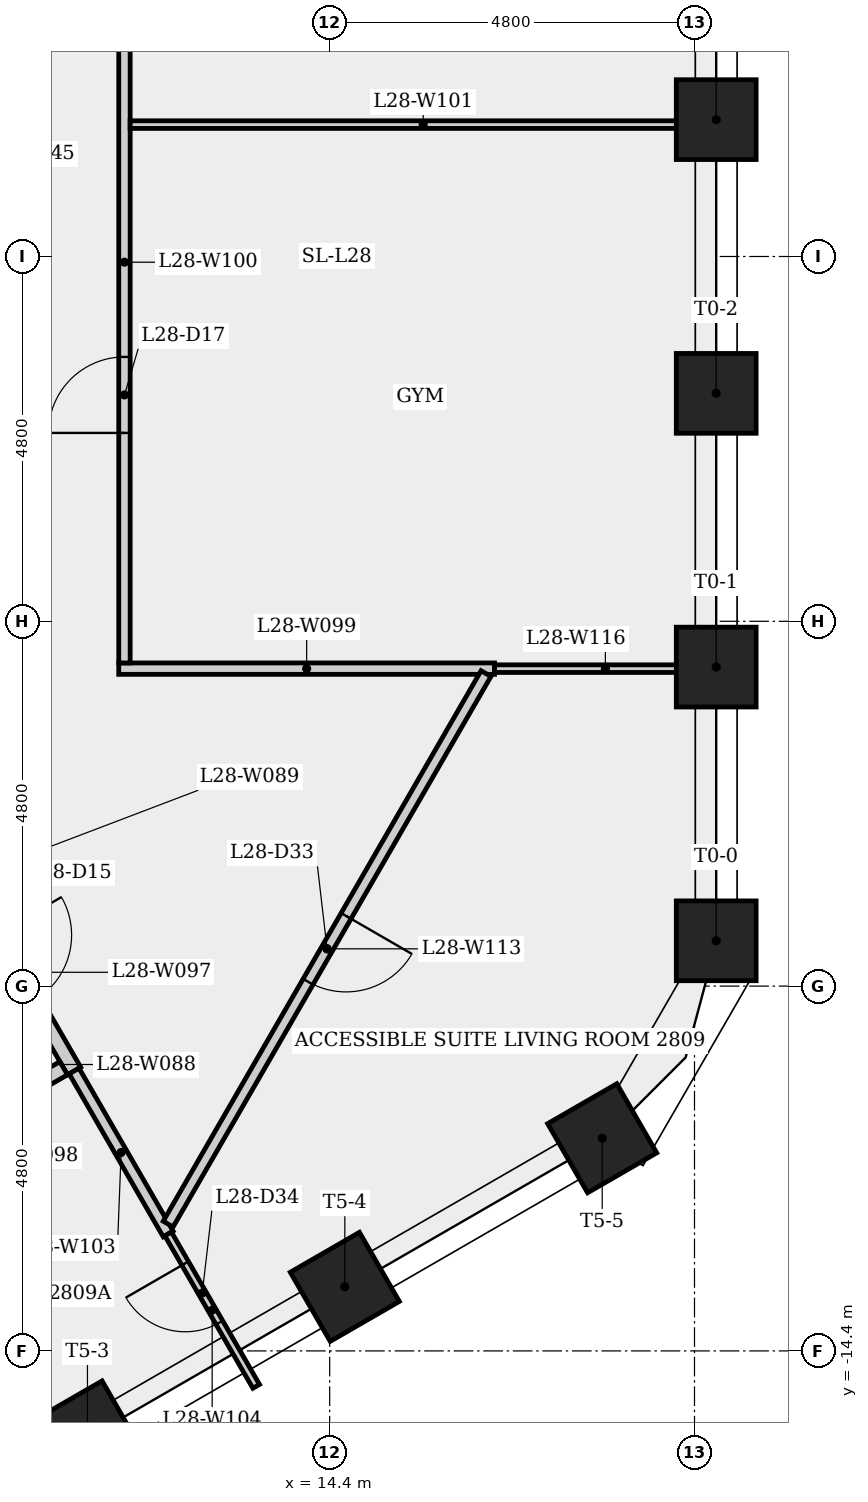
"""IFC4 building model, lengths in metres.
Left out: names, types, materials, properties, quantities, classifications, styles, units other than length and angle.
Written with IfcOpenShell. Run it as: python <this file> out.ifc"""

import sys

from ifc_helpers import new_model, si_unit, direction, frame, frame_2d, origin, origin_2d, place, context, subcontext, project, spatial, rectangle, extrude, element, fill, save


model = new_model("IFC4")
c1 = context("Model", 3, precision=1e-05, world=origin(), true_north=direction((0.0, 1.0)))
c2 = subcontext(c1, "Body", "Model", "MODEL_VIEW")
j1 = project(units=[si_unit("LENGTHUNIT", "METRE"), si_unit("PLANEANGLEUNIT", "RADIAN")], contexts=[c1])
p1 = place(None, origin())
s1 = spatial("IfcSite", under=j1, at=p1, CompositionType="ELEMENT")
p2 = place(p1, origin())
s2 = spatial("IfcBuilding", under=s1, at=p2, CompositionType="ELEMENT")
p3 = place(p2, frame((0.0, 0.0, 106.9)))
s3 = spatial("IfcBuildingStorey", under=s2, at=p3, CompositionType="ELEMENT", Elevation=106.9)
for number, where, z_axis, x_axis in (
    (1, (19.486, -9.004, 0.0), (0.0, 0.0, 1.0), (1.0, 0.0, 0.0)),
    (2, (19.486, -5.402, 0.0), (0.0, 0.0, 1.0), (1.0, 0.0, 0.0)),
    (3, (19.486, -1.801, 0.0), (0.0, 0.0, 1.0), (1.0, 0.0, 0.0)),
    (4, (19.486, 1.801, 0.0), (0.0, 0.0, 1.0), (1.0, 0.0, 0.0)),
    (5, (11.213, -15.512, 0.0), (0.0, 0.0, 1.0), (0.5, -0.866, 0.0)),
    (6, (14.599, -13.557, 0.0), (0.0, 0.0, 1.0), (0.5, -0.866, 0.0)),
    (7, (17.986, -11.602, 0.0), (0.0, 0.0, 1.0), (0.5, -0.866, 0.0)),
):
    element("IfcColumn", number, at=place(p3, frame(where, z_axis=z_axis, x_axis=x_axis)), inside=s3, PredefinedType="COLUMN", context=c2, shape_type="SweptSolid", body=[
        extrude(rectangle(XDim=1.05, YDim=1.05, at=origin_2d()), origin(), (0.0, 0.0, 1.0), 3.4),
    ])
p4 = place(p3, frame((9.537, -8.119, 0.0), z_axis=(0.0, 0.0, 1.0), x_axis=(0.499990139034, -0.866031096941, 0.0)))
e8 = element("IfcWall", 8, at=p4, inside=s3, PredefinedType="PARTITIONING", context=c2, shape_type="SweptSolid", body=[
    extrude(rectangle(XDim=3.0, YDim=0.2, at=frame_2d((1.5, 0.0))), origin(), (0.0, 0.0, 1.0), 3.05),
])
p5 = place(p4, frame((0.935, 0.0, 0.0)))
e9 = element("IfcOpeningElement", 9, at=p5, cuts=e8, PredefinedType="OPENING", context=c2, shape_type="SweptSolid", body=[
    extrude(rectangle(XDim=1.0, YDim=2.1, at=frame_2d((0.5, 1.05))), frame((0.0, 0.11, 0.0), z_axis=(0.0, -1.0, 0.0), x_axis=(1.0, 0.0, 0.0)), (0.0, 0.0, 1.0), 0.22),
])
p6 = place(p3, frame((10.901, -10.681, 0.0), z_axis=(0.0, 0.0, 1.0), x_axis=(-0.866007538022, -0.500030943131, 0.0)))
e10 = element("IfcWall", 10, at=p6, inside=s3, PredefinedType="PARTITIONING", context=c2, shape_type="SweptSolid", body=[
    extrude(rectangle(XDim=2.375, YDim=0.2, at=frame_2d((1.188, 0.0))), origin(), (0.0, 0.0, 1.0), 3.05),
])
p7 = place(p3, frame((11.625, -5.423, 0.0), z_axis=(0.0, 0.0, 1.0), x_axis=(1.0, 0.0, 0.0)))
e11 = element("IfcWall", 11, at=p7, inside=s3, PredefinedType="PARTITIONING", context=c2, shape_type="SweptSolid", body=[
    extrude(rectangle(XDim=4.944, YDim=0.15, at=frame_2d((2.472, 0.0))), origin(), (0.0, 0.0, 1.0), 3.05),
])
p8 = place(p3, frame((11.7, -5.348, 0.0), z_axis=(0.0, 0.0, 1.0), x_axis=(0.0, 1.0, 0.0)))
e12 = element("IfcWall", 12, at=p8, inside=s3, PredefinedType="PARTITIONING", context=c2, shape_type="SweptSolid", body=[
    extrude(rectangle(XDim=10.546, YDim=0.15, at=frame_2d((5.273, 0.0))), origin(), (0.0, 0.0, 1.0), 3.05),
])
p9 = place(p8, frame((3.027, 0.0, 0.0)))
e13 = element("IfcOpeningElement", 13, at=p9, cuts=e12, PredefinedType="OPENING", context=c2, shape_type="SweptSolid", body=[
    extrude(rectangle(XDim=1.0, YDim=2.1, at=frame_2d((0.5, 1.05))), frame((0.0, 0.085, 0.0), z_axis=(0.0, -1.0, 0.0), x_axis=(1.0, 0.0, 0.0)), (0.0, 0.0, 1.0), 0.17),
])
p10 = place(p3, frame((11.775, 1.735, 0.0), z_axis=(0.0, 0.0, 1.0), x_axis=(1.0, 0.0, 0.0)))
e14 = element("IfcWall", 14, at=p10, inside=s3, PredefinedType="PARTITIONING", context=c2, shape_type="SweptSolid", body=[
    extrude(rectangle(XDim=7.711, YDim=0.1, at=frame_2d((3.855, 0.0))), origin(), (0.0, 0.0, 1.0), 3.05),
])
p11 = place(p3, frame((12.275, -12.861, 0.0), z_axis=(0.0, 0.0, 1.0), x_axis=(-0.499904577418, 0.866080489029, 0.0)))
e15 = element("IfcWall", 15, at=p11, inside=s3, PredefinedType="PARTITIONING", context=c2, shape_type="SweptSolid", body=[
    extrude(rectangle(XDim=2.476, YDim=0.15, at=frame_2d((1.238, 0.0))), origin(), (0.0, 0.0, 1.0), 3.05),
])
p12 = place(p3, frame((13.433, -14.866, 0.0), z_axis=(0.0, 0.0, 1.0), x_axis=(-0.500050991752, 0.865995961681, 0.0)))
e16 = element("IfcWall", 16, at=p12, inside=s3, PredefinedType="PARTITIONING", context=c2, shape_type="SweptSolid", body=[
    extrude(rectangle(XDim=2.316, YDim=0.1, at=frame_2d((1.158, 0.0))), origin(), (0.0, 0.0, 1.0), 3.05),
])
p13 = place(p12, frame((0.968, 0.0, 0.0)))
e17 = element("IfcOpeningElement", 17, at=p13, cuts=e16, PredefinedType="OPENING", context=c2, shape_type="SweptSolid", body=[
    extrude(rectangle(XDim=0.9, YDim=2.1, at=frame_2d((0.45, 1.05))), frame((0.0, 0.06, 0.0), z_axis=(0.0, -1.0, 0.0), x_axis=(1.0, 0.0, 0.0)), (0.0, 0.0, 1.0), 0.12),
])
p14 = place(p3, frame((16.457, -5.488, 0.0), z_axis=(0.0, 0.0, 1.0), x_axis=(-0.499991130599, -0.866030524475, 0.0)))
e18 = element("IfcWall", 18, at=p14, inside=s3, PredefinedType="PARTITIONING", context=c2, shape_type="SweptSolid", body=[
    extrude(rectangle(XDim=8.364, YDim=0.15, at=frame_2d((4.182, 0.0))), origin(), (0.0, 0.0, 1.0), 3.05),
])
p15 = place(p14, frame((3.682, 0.0, 0.0)))
e19 = element("IfcOpeningElement", 19, at=p15, cuts=e18, PredefinedType="OPENING", context=c2, shape_type="SweptSolid", body=[
    extrude(rectangle(XDim=1.0, YDim=2.1, at=frame_2d((0.5, 1.05))), frame((0.0, 0.085, 0.0), z_axis=(0.0, -1.0, 0.0), x_axis=(1.0, 0.0, 0.0)), (0.0, 0.0, 1.0), 0.17),
])
p16 = place(p3, frame((19.486, -5.423, 0.0), z_axis=(0.0, 0.0, 1.0), x_axis=(-1.0, 0.0, 0.0)))
e20 = element("IfcWall", 20, at=p16, inside=s3, PredefinedType="PARTITIONING", context=c2, shape_type="SweptSolid", body=[
    extrude(rectangle(XDim=2.916, YDim=0.1, at=frame_2d((1.458, 0.0))), origin(), (0.0, 0.0, 1.0), 3.05),
])
p17 = place(p9, origin())
e21 = element("IfcDoor", 21, at=p17, inside=s3, OperationType="SINGLE_SWING_LEFT", PredefinedType="DOOR", context=c2, shape_type="SweptSolid", body=[
    extrude(rectangle(XDim=1.0, YDim=2.1, at=frame_2d((0.5, 1.05))), frame((0.0, 0.025, 0.0), z_axis=(0.0, -1.0, 0.0), x_axis=(1.0, 0.0, 0.0)), (0.0, 0.0, 1.0), 0.05),
])
fill(e13, e21)
p18 = place(p15, origin())
e22 = element("IfcDoor", 22, at=p18, inside=s3, OperationType="SINGLE_SWING_LEFT", PredefinedType="DOOR", context=c2, shape_type="SweptSolid", body=[
    extrude(rectangle(XDim=1.0, YDim=2.1, at=frame_2d((0.5, 1.05))), frame((0.0, 0.025, 0.0), z_axis=(0.0, -1.0, 0.0), x_axis=(1.0, 0.0, 0.0)), (0.0, 0.0, 1.0), 0.05),
])
fill(e19, e22)
p19 = place(p13, origin())
e23 = element("IfcDoor", 23, at=p19, inside=s3, OperationType="SINGLE_SWING_RIGHT", PredefinedType="DOOR", context=c2, shape_type="SweptSolid", body=[
    extrude(rectangle(XDim=0.9, YDim=2.1, at=frame_2d((0.45, 1.05))), frame((0.0, 0.025, 0.0), z_axis=(0.0, -1.0, 0.0), x_axis=(1.0, 0.0, 0.0)), (0.0, 0.0, 1.0), 0.05),
])
fill(e17, e23)
save(model, sys.argv[1])
